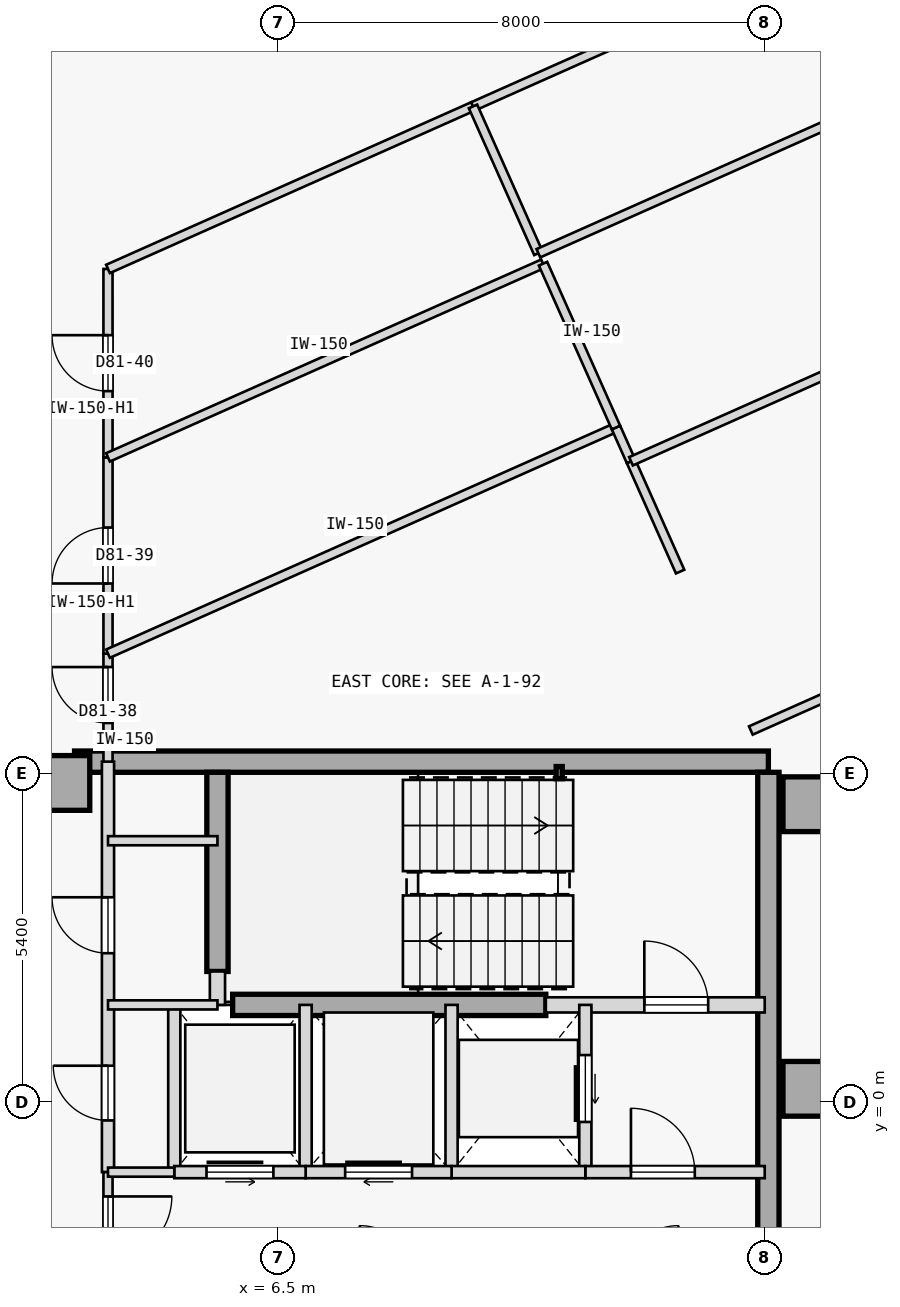
"""IFC4 building model, lengths in metres.
Left out: names, types, materials, properties, quantities, classifications, styles, units other than length and angle.
Written with IfcOpenShell. Run it as: python <this file> out.ifc"""

import sys

from ifc_helpers import new_model, si_unit, direction, frame, frame_2d, origin, origin_2d, place, context, subcontext, project, spatial, rectangle, hollow_rectangle, extrude, element, fill, save


model = new_model("IFC4")
c1 = context("Model", 3, precision=1e-05, world=origin(), true_north=direction((0.0, 1.0)))
c2 = subcontext(c1, "Body", "Model", "MODEL_VIEW")
j1 = project(units=[si_unit("LENGTHUNIT", "METRE"), si_unit("PLANEANGLEUNIT", "RADIAN")], contexts=[c1])
p1 = place(None, origin())
s1 = spatial("IfcSite", under=j1, at=p1, CompositionType="ELEMENT")
p2 = place(p1, origin())
s2 = spatial("IfcBuilding", under=s1, at=p2, CompositionType="ELEMENT")
p3 = place(p2, frame((0.0, 0.0, 302.0)))
s3 = spatial("IfcBuildingStorey", under=s2, at=p3, CompositionType="ELEMENT", Elevation=302.0)
for number, where, z_axis, x_axis in (
    (1, (15.25, 4.9, 0.0), (0.0, 0.0, 1.0), (1.0, 0.0, 0.0)),
    (2, (15.25, 0.22, 0.0), (0.0, 0.0, 1.0), (1.0, 0.0, 0.0)),
    (3, (2.95, 5.25, 0.0), (0.0, 0.0, 1.0), (1.0, 0.0, 0.0)),
):
    element("IfcColumn", number, at=place(p3, frame(where, z_axis=z_axis, x_axis=x_axis)), inside=s3, PredefinedType="COLUMN", context=c2, shape_type="SweptSolid", body=[
        extrude(rectangle(XDim=0.9, YDim=0.9, at=origin_2d()), origin(), (0.0, 0.0, 1.0), 3.55),
    ])
p4 = place(p3, frame((3.15, 5.6, 0.0), z_axis=(0.0, 0.0, 1.0), x_axis=(1.0, 0.0, 0.0)))
e4 = element("IfcWall", 4, at=p4, inside=s3, PredefinedType="SHEAR", context=c2, shape_type="SweptSolid", body=[
    extrude(rectangle(XDim=11.41, YDim=0.35, at=frame_2d((5.705, 0.0))), origin(), (0.0, 0.0, 1.0), 3.145),
])
p5 = place(p3, frame((14.56, -5.425, 0.0), z_axis=(0.0, 0.0, 1.0), x_axis=(0.0, 1.0, 0.0)))
e5 = element("IfcWall", 5, at=p5, inside=s3, PredefinedType="SHEAR", context=c2, shape_type="SweptSolid", body=[
    extrude(rectangle(XDim=10.85, YDim=0.35, at=frame_2d((5.425, 0.0))), origin(), (0.0, 0.0, 1.0), 3.145),
])
p6 = place(p3, frame((5.5, 2.15, 0.0), z_axis=(0.0, 0.0, 1.0), x_axis=(0.0, 1.0, 0.0)))
e6 = element("IfcWall", 6, at=p6, inside=s3, PredefinedType="SHEAR", context=c2, shape_type="SweptSolid", body=[
    extrude(rectangle(XDim=3.275, YDim=0.35, at=frame_2d((1.638, 0.0))), origin(), (0.0, 0.0, 1.0), 3.145),
])
p7 = place(p3, frame((5.75, 1.6, 0.0), z_axis=(0.0, 0.0, 1.0), x_axis=(1.0, 0.0, 0.0)))
e7 = element("IfcWall", 7, at=p7, inside=s3, PredefinedType="SHEAR", context=c2, shape_type="SweptSolid", body=[
    extrude(rectangle(XDim=5.15, YDim=0.35, at=frame_2d((2.575, 0.0))), origin(), (0.0, 0.0, 1.0), 3.145),
])
p8 = place(p3, frame((11.12, 5.42, 0.0), z_axis=(0.0, 0.0, 1.0), x_axis=(1.0, 0.0, 0.0)))
e8 = element("IfcColumn", 8, at=p8, inside=s3, PredefinedType="COLUMN", context=c2, shape_type="SweptSolid", body=[
    extrude(hollow_rectangle(XDim=0.1, YDim=0.2, WallThickness=0.008, at=origin_2d()), origin(), (0.0, 0.0, 1.0), 3.55),
])
p9 = place(p3, frame((10.9, 1.6, 0.0), z_axis=(0.0, 0.0, 1.0), x_axis=(1.0, 0.0, 0.0)))
e9 = element("IfcWall", 9, at=p9, inside=s3, PredefinedType="STANDARD", context=c2, shape_type="SweptSolid", body=[
    extrude(rectangle(XDim=3.6, YDim=0.25, at=frame_2d((1.8, 0.0))), origin(), (0.0, 0.0, 1.0), 3.145),
])
p10 = place(p9, frame((1.62, 0.0, 0.0)))
e10 = element("IfcOpeningElement", 10, at=p10, cuts=e9, PredefinedType="OPENING", context=c2, shape_type="SweptSolid", body=[
    extrude(rectangle(XDim=1.05, YDim=2.15, at=frame_2d((0.525, 1.075))), frame((0.0, 0.135, 0.0), z_axis=(0.0, -1.0, 0.0), x_axis=(1.0, 0.0, 0.0)), (0.0, 0.0, 1.0), 0.27),
])
p11 = place(p3, frame((5.5, 1.6, 0.0), z_axis=(0.0, 0.0, 1.0), x_axis=(0.0, 1.0, 0.0)))
e11 = element("IfcWall", 11, at=p11, inside=s3, PredefinedType="STANDARD", context=c2, shape_type="SweptSolid", body=[
    extrude(rectangle(XDim=0.55, YDim=0.25, at=frame_2d((0.275, 0.0))), origin(), (0.0, 0.0, 1.0), 3.145),
])
p12 = place(p3, frame((3.7, -1.15, 0.0), z_axis=(0.0, 0.0, 1.0), x_axis=(0.0, 1.0, 0.0)))
e12 = element("IfcWall", 12, at=p12, inside=s3, PredefinedType="STANDARD", context=c2, shape_type="SweptSolid", body=[
    extrude(rectangle(XDim=6.75, YDim=0.2, at=frame_2d((3.375, 0.0))), origin(), (0.0, 0.0, 1.0), 3.145),
])
p13 = place(p12, frame((3.6, 0.0, 0.0)))
e13 = element("IfcOpeningElement", 13, at=p13, cuts=e12, PredefinedType="OPENING", context=c2, shape_type="SweptSolid", body=[
    extrude(rectangle(XDim=0.92, YDim=2.04, at=frame_2d((0.46, 1.02))), frame((0.0, 0.11, 0.0), z_axis=(0.0, -1.0, 0.0), x_axis=(1.0, 0.0, 0.0)), (0.0, 0.0, 1.0), 0.22),
])
p14 = place(p12, frame((0.85, 0.0, 0.0)))
e14 = element("IfcOpeningElement", 14, at=p14, cuts=e12, PredefinedType="OPENING", context=c2, shape_type="SweptSolid", body=[
    extrude(rectangle(XDim=0.9, YDim=2.04, at=frame_2d((0.45, 1.02))), frame((0.0, 0.11, 0.0), z_axis=(0.0, -1.0, 0.0), x_axis=(1.0, 0.0, 0.0)), (0.0, 0.0, 1.0), 0.22),
])
p15 = place(p3, frame((3.7, -2.95, 0.0), z_axis=(0.0, 0.0, 1.0), x_axis=(0.0, 1.0, 0.0)))
e15 = element("IfcWall", 15, at=p15, inside=s3, PredefinedType="PARTITIONING", context=c2, shape_type="SweptSolid", body=[
    extrude(rectangle(XDim=1.8, YDim=0.15, at=frame_2d((0.9, 0.0))), origin(), (0.0, 0.0, 1.0), 3.145),
])
p16 = place(p15, frame((0.35, 0.0, 0.0)))
e16 = element("IfcOpeningElement", 16, at=p16, cuts=e15, PredefinedType="OPENING", context=c2, shape_type="SweptSolid", body=[
    extrude(rectangle(XDim=1.05, YDim=2.18, at=frame_2d((0.525, 1.09))), frame((0.0, 0.085, 0.0), z_axis=(0.0, -1.0, 0.0), x_axis=(1.0, 0.0, 0.0)), (0.0, 0.0, 1.0), 0.17),
])
p17 = place(p3, frame((11.55, -1.15, 0.0), z_axis=(0.0, 0.0, 1.0), x_axis=(0.0, 1.0, 0.0)))
e17 = element("IfcWall", 17, at=p17, inside=s3, PredefinedType="STANDARD", context=c2, shape_type="SweptSolid", body=[
    extrude(rectangle(XDim=2.75, YDim=0.2, at=frame_2d((1.375, 0.0))), origin(), (0.0, 0.0, 1.0), 3.145),
])
p18 = place(p17, frame((0.825, 0.0, 0.0)))
e18 = element("IfcOpeningElement", 18, at=p18, cuts=e17, PredefinedType="OPENING", context=c2, shape_type="SweptSolid", body=[
    extrude(rectangle(XDim=1.1, YDim=2.15, at=frame_2d((0.55, 1.075))), frame((0.0, 0.11, 0.0), z_axis=(0.0, -1.0, 0.0), x_axis=(1.0, 0.0, 0.0)), (0.0, 0.0, 1.0), 0.22),
])
p19 = place(p3, frame((9.35, -1.15, 0.0), z_axis=(0.0, 0.0, 1.0), x_axis=(0.0, 1.0, 0.0)))
e19 = element("IfcWall", 19, at=p19, inside=s3, PredefinedType="STANDARD", context=c2, shape_type="SweptSolid", body=[
    extrude(rectangle(XDim=2.75, YDim=0.2, at=frame_2d((1.375, 0.0))), origin(), (0.0, 0.0, 1.0), 3.145),
])
p20 = place(p3, frame((11.55, -1.15, 0.0), z_axis=(0.0, 0.0, 1.0), x_axis=(1.0, 0.0, 0.0)))
e20 = element("IfcWall", 20, at=p20, inside=s3, PredefinedType="STANDARD", context=c2, shape_type="SweptSolid", body=[
    extrude(rectangle(XDim=2.95, YDim=0.2, at=frame_2d((1.475, 0.0))), origin(), (0.0, 0.0, 1.0), 3.145),
])
p21 = place(p20, frame((0.75, 0.0, 0.0)))
e21 = element("IfcOpeningElement", 21, at=p21, cuts=e20, PredefinedType="OPENING", context=c2, shape_type="SweptSolid", body=[
    extrude(rectangle(XDim=1.05, YDim=2.18, at=frame_2d((0.525, 1.09))), frame((0.0, 0.11, 0.0), z_axis=(0.0, -1.0, 0.0), x_axis=(1.0, 0.0, 0.0)), (0.0, 0.0, 1.0), 0.22),
])
p22 = place(p3, frame((9.35, -1.15, 0.0), z_axis=(0.0, 0.0, 1.0), x_axis=(1.0, 0.0, 0.0)))
e22 = element("IfcWall", 22, at=p22, inside=s3, PredefinedType="STANDARD", context=c2, shape_type="SweptSolid", body=[
    extrude(rectangle(XDim=2.2, YDim=0.2, at=frame_2d((1.1, 0.0))), origin(), (0.0, 0.0, 1.0), 3.145),
])
p23 = place(p3, frame((6.95, -1.15, 0.0), z_axis=(0.0, 0.0, 1.0), x_axis=(0.0, 1.0, 0.0)))
e23 = element("IfcWall", 23, at=p23, inside=s3, PredefinedType="STANDARD", context=c2, shape_type="SweptSolid", body=[
    extrude(rectangle(XDim=2.75, YDim=0.2, at=frame_2d((1.375, 0.0))), origin(), (0.0, 0.0, 1.0), 3.145),
])
p24 = place(p3, frame((6.95, -1.15, 0.0), z_axis=(0.0, 0.0, 1.0), x_axis=(1.0, 0.0, 0.0)))
e24 = element("IfcWall", 24, at=p24, inside=s3, PredefinedType="STANDARD", context=c2, shape_type="SweptSolid", body=[
    extrude(rectangle(XDim=2.4, YDim=0.2, at=frame_2d((1.2, 0.0))), origin(), (0.0, 0.0, 1.0), 3.145),
])
p25 = place(p24, frame((0.65, 0.0, 0.0)))
e25 = element("IfcOpeningElement", 25, at=p25, cuts=e24, PredefinedType="OPENING", context=c2, shape_type="SweptSolid", body=[
    extrude(rectangle(XDim=1.1, YDim=2.15, at=frame_2d((0.55, 1.075))), frame((0.0, 0.11, 0.0), z_axis=(0.0, -1.0, 0.0), x_axis=(1.0, 0.0, 0.0)), (0.0, 0.0, 1.0), 0.22),
])
p26 = place(p3, frame((4.79, -1.15, 0.0), z_axis=(0.0, 0.0, 1.0), x_axis=(0.0, 1.0, 0.0)))
e26 = element("IfcWall", 26, at=p26, inside=s3, PredefinedType="STANDARD", context=c2, shape_type="SweptSolid", body=[
    extrude(rectangle(XDim=2.75, YDim=0.2, at=frame_2d((1.375, 0.0))), origin(), (0.0, 0.0, 1.0), 3.145),
])
p27 = place(p3, frame((4.79, -1.15, 0.0), z_axis=(0.0, 0.0, 1.0), x_axis=(1.0, 0.0, 0.0)))
e27 = element("IfcWall", 27, at=p27, inside=s3, PredefinedType="STANDARD", context=c2, shape_type="SweptSolid", body=[
    extrude(rectangle(XDim=2.16, YDim=0.2, at=frame_2d((1.08, 0.0))), origin(), (0.0, 0.0, 1.0), 3.145),
])
p28 = place(p27, frame((0.53, 0.0, 0.0)))
e28 = element("IfcOpeningElement", 28, at=p28, cuts=e27, PredefinedType="OPENING", context=c2, shape_type="SweptSolid", body=[
    extrude(rectangle(XDim=1.1, YDim=2.15, at=frame_2d((0.55, 1.075))), frame((0.0, 0.11, 0.0), z_axis=(0.0, -1.0, 0.0), x_axis=(1.0, 0.0, 0.0)), (0.0, 0.0, 1.0), 0.22),
])
p29 = place(p3, frame((3.7, -1.15, 0.0), z_axis=(0.0, 0.0, 1.0), x_axis=(1.0, 0.0, 0.0)))
e29 = element("IfcWall", 29, at=p29, inside=s3, PredefinedType="PARTITIONING", context=c2, shape_type="SweptSolid", body=[
    extrude(rectangle(XDim=1.09, YDim=0.15, at=frame_2d((0.545, 0.0))), origin(), (0.0, 0.0, 1.0), 3.145),
])
for number, where, z_axis, x_axis in (
    (30, (3.7, 4.3, 0.0), (0.0, 0.0, 1.0), (1.0, 0.0, 0.0)),
    (31, (3.7, 1.6, 0.0), (0.0, 0.0, 1.0), (1.0, 0.0, 0.0)),
):
    element("IfcWall", number, at=place(p3, frame(where, z_axis=z_axis, x_axis=x_axis)), inside=s3, PredefinedType="PARTITIONING", context=c2, shape_type="SweptSolid", body=[
        extrude(rectangle(XDim=1.8, YDim=0.15, at=frame_2d((0.9, 0.0))), origin(), (0.0, 0.0, 1.0), 3.145),
    ])
p30 = place(p3, frame((3.7, 5.601, 0.0), z_axis=(0.0, 0.0, 1.0), x_axis=(0.0, 1.0, 0.0)))
e32 = element("IfcWall", 32, at=p30, inside=s3, PredefinedType="PARTITIONING", context=c2, shape_type="SweptSolid", body=[
    extrude(rectangle(XDim=1.775, YDim=0.15, at=frame_2d((0.888, 0.0))), origin(), (0.0, 0.0, 1.0), 3.145),
])
p31 = place(p30, frame((0.635, 0.0, 0.0)))
e33 = element("IfcOpeningElement", 33, at=p31, cuts=e32, PredefinedType="OPENING", context=c2, shape_type="SweptSolid", body=[
    extrude(rectangle(XDim=0.92, YDim=2.04, at=frame_2d((0.46, 1.02))), frame((0.0, 0.085, 0.0), z_axis=(0.0, -1.0, 0.0), x_axis=(1.0, 0.0, 0.0)), (0.0, 0.0, 1.0), 0.17),
])
p32 = place(p3, frame((3.7, 7.376, 0.0), z_axis=(0.0, 0.0, 1.0), x_axis=(0.0, 1.0, 0.0)))
e34 = element("IfcWall", 34, at=p32, inside=s3, PredefinedType="PARTITIONING", context=c2, shape_type="SweptSolid", body=[
    extrude(rectangle(XDim=3.228, YDim=0.15, at=frame_2d((1.614, 0.0))), origin(), (0.0, 0.0, 1.0), 2.695),
])
p33 = place(p32, frame((1.154, 0.0, 0.0)))
e35 = element("IfcOpeningElement", 35, at=p33, cuts=e34, PredefinedType="OPENING", context=c2, shape_type="SweptSolid", body=[
    extrude(rectangle(XDim=0.92, YDim=2.04, at=frame_2d((0.46, 1.02))), frame((0.0, 0.085, 0.0), z_axis=(0.0, -1.0, 0.0), x_axis=(1.0, 0.0, 0.0)), (0.0, 0.0, 1.0), 0.17),
])
p34 = place(p3, frame((3.7, 10.604, 0.0), z_axis=(0.0, 0.0, 1.0), x_axis=(-0.000157567161, 0.999999987586, 0.0)))
e36 = element("IfcWall", 36, at=p34, inside=s3, PredefinedType="PARTITIONING", context=c2, shape_type="SweptSolid", body=[
    extrude(rectangle(XDim=3.099, YDim=0.15, at=frame_2d((1.549, 0.0))), origin(), (0.0, 0.0, 1.0), 2.695),
])
p35 = place(p34, frame((1.089, 0.0, 0.0)))
e37 = element("IfcOpeningElement", 37, at=p35, cuts=e36, PredefinedType="OPENING", context=c2, shape_type="SweptSolid", body=[
    extrude(rectangle(XDim=0.92, YDim=2.04, at=frame_2d((0.46, 1.02))), frame((0.0, 0.085, 0.0), z_axis=(0.0, -1.0, 0.0), x_axis=(1.0, 0.0, 0.0)), (0.0, 0.0, 1.0), 0.17),
])
p36 = place(p3, frame((3.7, 13.703, 0.0), z_axis=(0.0, 0.0, 1.0), x_axis=(0.913549363376, 0.406727870542, 0.0)))
e38 = element("IfcWall", 38, at=p36, inside=s3, PredefinedType="PARTITIONING", context=c2, shape_type="SweptSolid", body=[
    extrude(rectangle(XDim=6.571, YDim=0.15, at=frame_2d((3.286, 0.0))), origin(), (0.0, 0.0, 1.0), 3.145),
])
p37 = place(p3, frame((9.703, 16.375, 0.0), z_axis=(0.0, 0.0, 1.0), x_axis=(0.913544622417, 0.406738519018, 0.0)))
e39 = element("IfcWall", 39, at=p37, inside=s3, PredefinedType="PARTITIONING", context=c2, shape_type="SweptSolid", body=[
    extrude(rectangle(XDim=14.192, YDim=0.15, at=frame_2d((7.096, 0.0))), origin(), (0.0, 0.0, 1.0), 3.145),
])
p38 = place(p37, frame((6.636, 0.0, 0.0)))
e40 = element("IfcOpeningElement", 40, at=p38, cuts=e39, PredefinedType="OPENING", context=c2, shape_type="SweptSolid", body=[
    extrude(rectangle(XDim=0.92, YDim=2.04, at=frame_2d((0.46, 1.02))), frame((0.0, 0.085, 0.0), z_axis=(0.0, -1.0, 0.0), x_axis=(1.0, 0.0, 0.0)), (0.0, 0.0, 1.0), 0.17),
])
p39 = place(p3, frame((3.7, 7.376, 0.0), z_axis=(0.0, 0.0, 1.0), x_axis=(0.91354490899, 0.406737875367, 0.0)))
e41 = element("IfcWall", 41, at=p39, inside=s3, PredefinedType="PARTITIONING", context=c2, shape_type="SweptSolid", body=[
    extrude(rectangle(XDim=9.144, YDim=0.15, at=frame_2d((4.572, 0.0))), origin(), (0.0, 0.0, 1.0), 3.145),
])
p40 = place(p3, frame((13.109, 8.726, 0.0), z_axis=(0.0, 0.0, 1.0), x_axis=(-0.406788519224, 0.913522359128, 0.0)))
e42 = element("IfcWall", 42, at=p40, inside=s3, PredefinedType="PARTITIONING", context=c2, shape_type="SweptSolid", body=[
    extrude(rectangle(XDim=1.986, YDim=0.15, at=frame_2d((0.993, 0.0))), origin(), (0.0, 0.0, 1.0), 3.145),
])
p41 = place(p3, frame((12.301, 10.54, 0.0), z_axis=(0.0, 0.0, 1.0), x_axis=(-0.406436552015, 0.913679007741, 0.0)))
e43 = element("IfcWall", 43, at=p41, inside=s3, PredefinedType="PARTITIONING", context=c2, shape_type="SweptSolid", body=[
    extrude(rectangle(XDim=0.608, YDim=0.15, at=frame_2d((0.304, 0.0))), origin(), (0.0, 0.0, 1.0), 3.145),
])
p42 = place(p3, frame((3.7, 10.604, 0.0), z_axis=(0.0, 0.0, 1.0), x_axis=(0.913534926439, 0.406760295722, 0.0)))
e44 = element("IfcWall", 44, at=p42, inside=s3, PredefinedType="PARTITIONING", context=c2, shape_type="SweptSolid", body=[
    extrude(rectangle(XDim=7.831, YDim=0.15, at=frame_2d((3.916, 0.0))), origin(), (0.0, 0.0, 1.0), 3.145),
])
p43 = place(p3, frame((12.054, 11.095, 0.0), z_axis=(0.0, 0.0, 1.0), x_axis=(-0.406798922371, 0.91351772657, 0.0)))
e45 = element("IfcWall", 45, at=p43, inside=s3, PredefinedType="PARTITIONING", context=c2, shape_type="SweptSolid", body=[
    extrude(rectangle(XDim=2.949, YDim=0.15, at=frame_2d((1.475, 0.0))), origin(), (0.0, 0.0, 1.0), 3.145),
])
p44 = place(p3, frame((10.778, 13.961, 0.0), z_axis=(0.0, 0.0, 1.0), x_axis=(-0.406712614091, 0.913556155657, 0.0)))
e46 = element("IfcWall", 46, at=p44, inside=s3, PredefinedType="PARTITIONING", context=c2, shape_type="SweptSolid", body=[
    extrude(rectangle(XDim=2.643, YDim=0.15, at=frame_2d((1.322, 0.0))), origin(), (0.0, 0.0, 1.0), 3.145),
])
p45 = place(p3, frame((14.272, 6.113, 0.0), z_axis=(0.0, 0.0, 1.0), x_axis=(0.913551014388, 0.406724162191, 0.0)))
e47 = element("IfcWall", 47, at=p45, inside=s3, PredefinedType="PARTITIONING", context=c2, shape_type="SweptSolid", body=[
    extrude(rectangle(XDim=14.192, YDim=0.15, at=frame_2d((7.096, 0.0))), origin(), (0.0, 0.0, 1.0), 3.145),
])
p46 = place(p45, frame((6.636, 0.0, 0.0)))
e48 = element("IfcOpeningElement", 48, at=p46, cuts=e47, PredefinedType="OPENING", context=c2, shape_type="SweptSolid", body=[
    extrude(rectangle(XDim=0.92, YDim=2.04, at=frame_2d((0.46, 1.02))), frame((0.0, 0.085, 0.0), z_axis=(0.0, -1.0, 0.0), x_axis=(1.0, 0.0, 0.0)), (0.0, 0.0, 1.0), 0.17),
])
p47 = place(p3, frame((12.301, 10.54, 0.0), z_axis=(0.0, 0.0, 1.0), x_axis=(0.913544622417, 0.406738519018, 0.0)))
e49 = element("IfcWall", 49, at=p47, inside=s3, PredefinedType="PARTITIONING", context=c2, shape_type="SweptSolid", body=[
    extrude(rectangle(XDim=14.192, YDim=0.15, at=frame_2d((7.096, 0.0))), origin(), (0.0, 0.0, 1.0), 2.695),
])
p48 = place(p47, frame((6.636, 0.0, 0.0)))
e50 = element("IfcOpeningElement", 50, at=p48, cuts=e49, PredefinedType="OPENING", context=c2, shape_type="SweptSolid", body=[
    extrude(rectangle(XDim=0.92, YDim=2.04, at=frame_2d((0.46, 1.02))), frame((0.0, 0.085, 0.0), z_axis=(0.0, -1.0, 0.0), x_axis=(1.0, 0.0, 0.0)), (0.0, 0.0, 1.0), 0.17),
])
p49 = place(p3, frame((10.778, 13.961, 0.0), z_axis=(0.0, 0.0, 1.0), x_axis=(0.913544622417, 0.406738519018, 0.0)))
e51 = element("IfcWall", 51, at=p49, inside=s3, PredefinedType="PARTITIONING", context=c2, shape_type="SweptSolid", body=[
    extrude(rectangle(XDim=14.192, YDim=0.15, at=frame_2d((7.096, 0.0))), origin(), (0.0, 0.0, 1.0), 3.145),
])
p50 = place(p10, origin())
e52 = element("IfcDoor", 52, at=p50, inside=s3, OperationType="SINGLE_SWING_LEFT", PredefinedType="DOOR", context=c2, shape_type="SweptSolid", body=[
    extrude(rectangle(XDim=1.05, YDim=2.15, at=frame_2d((0.525, 1.075))), frame((0.0, 0.025, 0.0), z_axis=(0.0, -1.0, 0.0), x_axis=(1.0, 0.0, 0.0)), (0.0, 0.0, 1.0), 0.05),
])
fill(e10, e52)
p51 = place(p21, origin())
e53 = element("IfcDoor", 53, at=p51, inside=s3, OperationType="SINGLE_SWING_LEFT", PredefinedType="DOOR", context=c2, shape_type="SweptSolid", body=[
    extrude(rectangle(XDim=1.05, YDim=2.18, at=frame_2d((0.525, 1.09))), frame((0.0, 0.025, 0.0), z_axis=(0.0, -1.0, 0.0), x_axis=(1.0, 0.0, 0.0)), (0.0, 0.0, 1.0), 0.05),
])
fill(e21, e53)
p52 = place(p16, frame((1.05, 0.0, 0.0), z_axis=(0.0, 0.0, 1.0), x_axis=(-1.0, 0.0, 0.0)))
e54 = element("IfcDoor", 54, at=p52, inside=s3, OperationType="SINGLE_SWING_RIGHT", PredefinedType="DOOR", context=c2, shape_type="SweptSolid", body=[
    extrude(rectangle(XDim=1.05, YDim=2.18, at=frame_2d((0.525, 1.09))), frame((0.0, 0.025, 0.0), z_axis=(0.0, -1.0, 0.0), x_axis=(1.0, 0.0, 0.0)), (0.0, 0.0, 1.0), 0.05),
])
fill(e16, e54)
p53 = place(p18, origin())
e55 = element("IfcDoor", 55, at=p53, inside=s3, OperationType="SLIDING_TO_RIGHT", PredefinedType="DOOR", context=c2, shape_type="SweptSolid", body=[
    extrude(rectangle(XDim=1.1, YDim=2.15, at=frame_2d((0.55, 1.075))), frame((0.0, 0.025, 0.0), z_axis=(0.0, -1.0, 0.0), x_axis=(1.0, 0.0, 0.0)), (0.0, 0.0, 1.0), 0.05),
])
fill(e18, e55)
p54 = place(p25, origin())
e56 = element("IfcDoor", 56, at=p54, inside=s3, OperationType="SLIDING_TO_RIGHT", PredefinedType="DOOR", context=c2, shape_type="SweptSolid", body=[
    extrude(rectangle(XDim=1.1, YDim=2.15, at=frame_2d((0.55, 1.075))), frame((0.0, 0.025, 0.0), z_axis=(0.0, -1.0, 0.0), x_axis=(1.0, 0.0, 0.0)), (0.0, 0.0, 1.0), 0.05),
])
fill(e25, e56)
p55 = place(p28, origin())
e57 = element("IfcDoor", 57, at=p55, inside=s3, OperationType="SLIDING_TO_LEFT", PredefinedType="DOOR", context=c2, shape_type="SweptSolid", body=[
    extrude(rectangle(XDim=1.1, YDim=2.15, at=frame_2d((0.55, 1.075))), frame((0.0, 0.025, 0.0), z_axis=(0.0, -1.0, 0.0), x_axis=(1.0, 0.0, 0.0)), (0.0, 0.0, 1.0), 0.05),
])
fill(e28, e57)
p56 = place(p13, origin())
e58 = element("IfcDoor", 58, at=p56, inside=s3, OperationType="SINGLE_SWING_RIGHT", PredefinedType="DOOR", context=c2, shape_type="SweptSolid", body=[
    extrude(rectangle(XDim=0.92, YDim=2.04, at=frame_2d((0.46, 1.02))), frame((0.0, 0.025, 0.0), z_axis=(0.0, -1.0, 0.0), x_axis=(1.0, 0.0, 0.0)), (0.0, 0.0, 1.0), 0.05),
])
fill(e13, e58)
p57 = place(p14, origin())
e59 = element("IfcDoor", 59, at=p57, inside=s3, OperationType="SINGLE_SWING_RIGHT", PredefinedType="DOOR", context=c2, shape_type="SweptSolid", body=[
    extrude(rectangle(XDim=0.9, YDim=2.04, at=frame_2d((0.45, 1.02))), frame((0.0, 0.025, 0.0), z_axis=(0.0, -1.0, 0.0), x_axis=(1.0, 0.0, 0.0)), (0.0, 0.0, 1.0), 0.05),
])
fill(e14, e59)
p58 = place(p31, origin())
e60 = element("IfcDoor", 60, at=p58, inside=s3, OperationType="SINGLE_SWING_RIGHT", PredefinedType="DOOR", context=c2, shape_type="SweptSolid", body=[
    extrude(rectangle(XDim=0.92, YDim=2.04, at=frame_2d((0.46, 1.02))), frame((0.0, 0.025, 0.0), z_axis=(0.0, -1.0, 0.0), x_axis=(1.0, 0.0, 0.0)), (0.0, 0.0, 1.0), 0.05),
])
fill(e33, e60)
p59 = place(p33, origin())
e61 = element("IfcDoor", 61, at=p59, inside=s3, OperationType="SINGLE_SWING_LEFT", PredefinedType="DOOR", context=c2, shape_type="SweptSolid", body=[
    extrude(rectangle(XDim=0.92, YDim=2.04, at=frame_2d((0.46, 1.02))), frame((0.0, 0.025, 0.0), z_axis=(0.0, -1.0, 0.0), x_axis=(1.0, 0.0, 0.0)), (0.0, 0.0, 1.0), 0.05),
])
fill(e35, e61)
p60 = place(p35, origin())
e62 = element("IfcDoor", 62, at=p60, inside=s3, OperationType="SINGLE_SWING_RIGHT", PredefinedType="DOOR", context=c2, shape_type="SweptSolid", body=[
    extrude(rectangle(XDim=0.92, YDim=2.04, at=frame_2d((0.46, 1.02))), frame((0.0, 0.025, 0.0), z_axis=(0.0, -1.0, 0.0), x_axis=(1.0, 0.0, 0.0)), (0.0, 0.0, 1.0), 0.05),
])
fill(e37, e62)
save(model, sys.argv[1])
